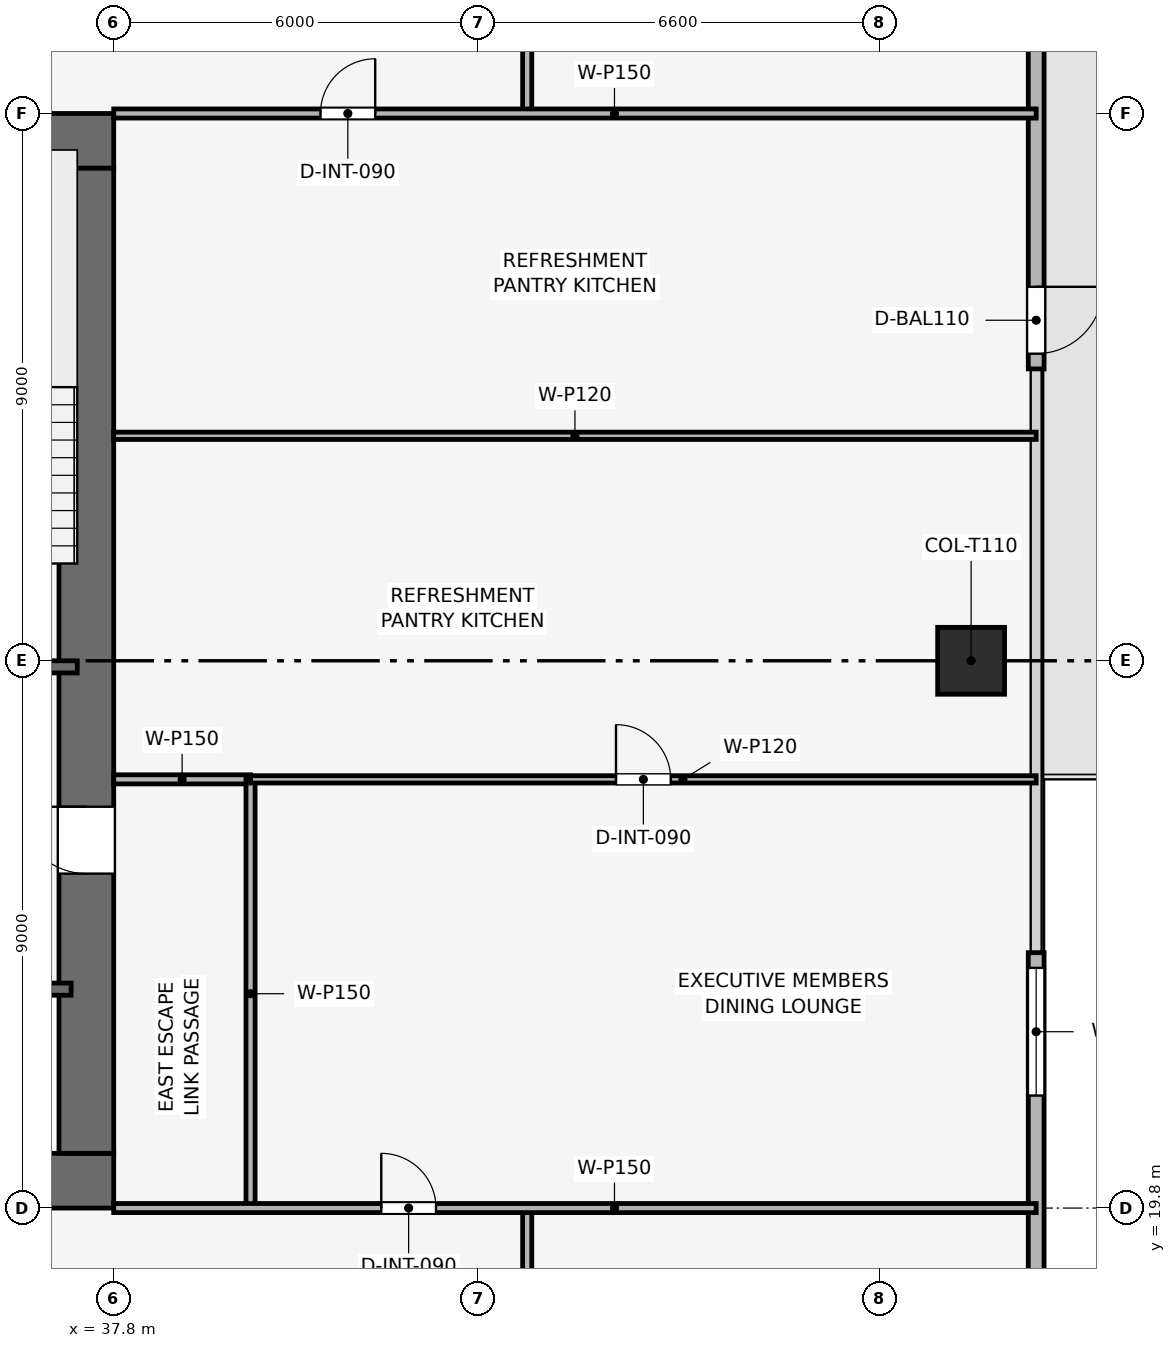
"""IFC4 building model, lengths in metres.
Left out: names, types, materials, properties, quantities, classifications, styles, units other than length and angle.
Written with IfcOpenShell. Run it as: python <this file> out.ifc"""

import sys

from ifc_helpers import new_model, si_unit, direction, frame, frame_2d, origin, origin_2d, place, context, subcontext, project, spatial, rectangle, extrude, element, fill, save


model = new_model("IFC4")
c1 = context("Model", 3, precision=1e-05, world=origin(), true_north=direction((0.0, 1.0)))
c2 = subcontext(c1, "Body", "Model", "MODEL_VIEW")
j1 = project(units=[si_unit("LENGTHUNIT", "METRE"), si_unit("PLANEANGLEUNIT", "RADIAN")], contexts=[c1])
p1 = place(None, origin())
s1 = spatial("IfcSite", under=j1, at=p1, CompositionType="ELEMENT")
p2 = place(p1, origin())
s2 = spatial("IfcBuilding", under=s1, at=p2, CompositionType="ELEMENT")
p3 = place(p2, frame((0.0, 0.0, 187.05)))
s3 = spatial("IfcBuildingStorey", under=s2, at=p3, CompositionType="ELEMENT", Elevation=187.05)
p4 = place(p3, frame((19.8, 20.25, 0.0), z_axis=(0.0, 0.0, 1.0), x_axis=(1.0, 0.0, 0.0)))
e1 = element("IfcWall", 1, at=p4, inside=s3, PredefinedType="SHEAR", context=c2, shape_type="SweptSolid", body=[
    extrude(rectangle(XDim=18.0, YDim=0.9, at=frame_2d((9.0, 0.0))), origin(), (0.0, 0.0, 1.0), 3.75),
])
p5 = place(p4, frame((8.4, 0.0, 0.0)))
e2 = element("IfcOpeningElement", 2, at=p5, cuts=e1, PredefinedType="OPENING", context=c2, shape_type="SweptSolid", body=[
    extrude(rectangle(XDim=1.2, YDim=2.2, at=frame_2d((0.6, 1.1))), frame((0.0, 0.46, 0.0), z_axis=(0.0, -1.0, 0.0), x_axis=(1.0, 0.0, 0.0)), (0.0, 0.0, 1.0), 0.92),
])
p6 = place(p3, frame((19.8, 37.35, 0.0), z_axis=(0.0, 0.0, 1.0), x_axis=(1.0, 0.0, 0.0)))
e3 = element("IfcWall", 3, at=p6, inside=s3, PredefinedType="SHEAR", context=c2, shape_type="SweptSolid", body=[
    extrude(rectangle(XDim=18.0, YDim=0.9, at=frame_2d((9.0, 0.0))), origin(), (0.0, 0.0, 1.0), 3.75),
])
p7 = place(p6, frame((7.05, 0.0, 0.0)))
e4 = element("IfcOpeningElement", 4, at=p7, cuts=e3, PredefinedType="OPENING", context=c2, shape_type="SweptSolid", body=[
    extrude(rectangle(XDim=1.1, YDim=2.15, at=frame_2d((0.55, 1.075))), frame((0.0, 0.46, 0.0), z_axis=(0.0, -1.0, 0.0), x_axis=(1.0, 0.0, 0.0)), (0.0, 0.0, 1.0), 0.92),
])
p8 = place(p3, frame((37.35, 20.7, 0.0), z_axis=(0.0, 0.0, 1.0), x_axis=(0.0, 1.0, 0.0)))
e5 = element("IfcWall", 5, at=p8, inside=s3, PredefinedType="SHEAR", context=c2, shape_type="SweptSolid", body=[
    extrude(rectangle(XDim=16.2, YDim=0.9, at=frame_2d((8.1, 0.0))), origin(), (0.0, 0.0, 1.0), 3.75),
])
p9 = place(p8, frame((4.6, 0.0, 0.0)))
e6 = element("IfcOpeningElement", 6, at=p9, cuts=e5, PredefinedType="OPENING", context=c2, shape_type="SweptSolid", body=[
    extrude(rectangle(XDim=1.1, YDim=2.15, at=frame_2d((0.55, 1.075))), frame((0.0, 0.46, 0.0), z_axis=(0.0, -1.0, 0.0), x_axis=(1.0, 0.0, 0.0)), (0.0, 0.0, 1.0), 0.92),
])
p10 = place(p3, frame((51.9, 28.8, 0.003), z_axis=(0.0, 0.0, 1.0), x_axis=(1.0, 0.0, 0.0)))
e7 = element("IfcColumn", 7, at=p10, inside=s3, PredefinedType="COLUMN", context=c2, shape_type="SweptSolid", body=[
    extrude(rectangle(XDim=1.1, YDim=1.1, at=origin_2d()), origin(), (0.0, 0.0, 1.0), 3.489),
])
p11 = place(p3, frame((52.97, 46.2, 0.0), z_axis=(0.0, 0.0, 1.0), x_axis=(0.0, -1.0, 0.0)))
e8 = element("IfcWall", 8, at=p11, inside=s3, PredefinedType="SOLIDWALL", context=c2, shape_type="SweptSolid", body=[
    extrude(rectangle(XDim=12.6, YDim=0.26, at=frame_2d((6.3, 0.0))), origin(), (0.0, 0.0, 1.0), 3.495),
])
p12 = place(p11, frame((11.25, 0.0, 0.0)))
e9 = element("IfcOpeningElement", 9, at=p12, cuts=e8, PredefinedType="OPENING", context=c2, shape_type="SweptSolid", body=[
    extrude(rectangle(XDim=1.1, YDim=2.2, at=frame_2d((0.55, 1.1))), frame((0.0, 0.14, 0.0), z_axis=(0.0, -1.0, 0.0), x_axis=(1.0, 0.0, 0.0)), (0.0, 0.0, 1.0), 0.28),
])
p13 = place(p3, frame((52.97, 24.0, 0.0), z_axis=(0.0, 0.0, 1.0), x_axis=(0.0, -1.0, 0.0)))
e10 = element("IfcWall", 10, at=p13, inside=s3, PredefinedType="SOLIDWALL", context=c2, shape_type="SweptSolid", body=[
    extrude(rectangle(XDim=12.6, YDim=0.26, at=frame_2d((6.3, 0.0))), origin(), (0.0, 0.0, 1.0), 3.495),
])
p14 = place(p13, frame((0.25, 0.0, 0.9)))
e11 = element("IfcOpeningElement", 11, at=p14, cuts=e10, PredefinedType="OPENING", context=c2, shape_type="SweptSolid", body=[
    extrude(rectangle(XDim=2.1, YDim=2.1, at=frame_2d((1.05, 1.05))), frame((0.0, 0.14, 0.0), z_axis=(0.0, -1.0, 0.0), x_axis=(1.0, 0.0, 0.0)), (0.0, 0.0, 1.0), 0.28),
])
p15 = place(p3, frame((34.05, 28.7, 0.0), z_axis=(0.0, 0.0, 1.0), x_axis=(1.0, 0.0, 0.0)))
e12 = element("IfcWall", 12, at=p15, inside=s3, PredefinedType="SHEAR", context=c2, shape_type="SweptSolid", body=[
    extrude(rectangle(XDim=3.15, YDim=0.2, at=frame_2d((1.575, 0.0))), origin(), (0.0, 0.0, 1.0), 3.495),
])
p16 = place(p15, frame((0.8, 0.0, 0.0)))
e13 = element("IfcOpeningElement", 13, at=p16, cuts=e12, PredefinedType="OPENING", context=c2, shape_type="SweptSolid", body=[
    extrude(rectangle(XDim=1.0, YDim=2.1, at=frame_2d((0.5, 1.05))), frame((0.0, 0.11, 0.0), z_axis=(0.0, -1.0, 0.0), x_axis=(1.0, 0.0, 0.0)), (0.0, 0.0, 1.0), 0.22),
])
p17 = place(p3, frame((34.05, 23.4, 0.0), z_axis=(0.0, 0.0, 1.0), x_axis=(1.0, 0.0, 0.0)))
e14 = element("IfcWall", 14, at=p17, inside=s3, PredefinedType="SHEAR", context=c2, shape_type="SweptSolid", body=[
    extrude(rectangle(XDim=3.05, YDim=0.2, at=frame_2d((1.525, 0.0))), origin(), (0.0, 0.0, 1.0), 3.495),
])
p18 = place(p17, frame((1.2, 0.0, 0.0)))
e15 = element("IfcOpeningElement", 15, at=p18, cuts=e14, PredefinedType="OPENING", context=c2, shape_type="SweptSolid", body=[
    extrude(rectangle(XDim=1.1, YDim=2.15, at=frame_2d((0.55, 1.075))), frame((0.0, 0.11, 0.0), z_axis=(0.0, -1.0, 0.0), x_axis=(1.0, 0.0, 0.0)), (0.0, 0.0, 1.0), 0.22),
])
p19 = place(p3, frame((37.8, 26.85, 0.0), z_axis=(0.0, 0.0, 1.0), x_axis=(1.0, 0.0, 0.0)))
e16 = element("IfcWall", 16, at=p19, inside=s3, PredefinedType="PARTITIONING", context=c2, shape_type="SweptSolid", body=[
    extrude(rectangle(XDim=2.25, YDim=0.15, at=frame_2d((1.125, 0.0))), origin(), (0.0, 0.0, 1.0), 3.495),
])
p20 = place(p3, frame((40.05, 19.8, 0.0), z_axis=(0.0, 0.0, 1.0), x_axis=(0.0, 1.0, 0.0)))
e17 = element("IfcWall", 17, at=p20, inside=s3, PredefinedType="PARTITIONING", context=c2, shape_type="SweptSolid", body=[
    extrude(rectangle(XDim=7.05, YDim=0.15, at=frame_2d((3.525, 0.0))), origin(), (0.0, 0.0, 1.0), 3.03),
])
p21 = place(p3, frame((40.05, 26.85, 0.0), z_axis=(0.0, 0.0, 1.0), x_axis=(1.0, 0.0, 0.0)))
e18 = element("IfcWall", 18, at=p21, inside=s3, PredefinedType="PARTITIONING", context=c2, shape_type="SweptSolid", body=[
    extrude(rectangle(XDim=12.92, YDim=0.12, at=frame_2d((6.46, 0.0))), origin(), (0.0, 0.0, 1.0), 2.98),
])
p22 = place(p21, frame((6.01, 0.0, 0.0)))
e19 = element("IfcOpeningElement", 19, at=p22, cuts=e18, PredefinedType="OPENING", context=c2, shape_type="SweptSolid", body=[
    extrude(rectangle(XDim=0.9, YDim=2.1, at=frame_2d((0.45, 1.05))), frame((0.0, 0.07, 0.0), z_axis=(0.0, -1.0, 0.0), x_axis=(1.0, 0.0, 0.0)), (0.0, 0.0, 1.0), 0.14),
])
p23 = place(p3, frame((37.8, 32.5, 0.0), z_axis=(0.0, 0.0, 1.0), x_axis=(1.0, 0.0, 0.0)))
e20 = element("IfcWall", 20, at=p23, inside=s3, PredefinedType="PARTITIONING", context=c2, shape_type="SweptSolid", body=[
    extrude(rectangle(XDim=15.17, YDim=0.12, at=frame_2d((7.585, 0.0))), origin(), (0.0, 0.0, 1.0), 2.98),
])
p24 = place(p3, frame((44.6, 17.4, 0.0), z_axis=(0.0, 0.0, 1.0), x_axis=(0.0, 1.0, 0.0)))
e21 = element("IfcWall", 21, at=p24, inside=s3, PredefinedType="PARTITIONING", context=c2, shape_type="SweptSolid", body=[
    extrude(rectangle(XDim=2.4, YDim=0.15, at=frame_2d((1.2, 0.0))), origin(), (0.0, 0.0, 1.0), 3.495),
])
p25 = place(p3, frame((44.6, 37.8, 0.0), z_axis=(0.0, 0.0, 1.0), x_axis=(0.0, 1.0, 0.0)))
e22 = element("IfcWall", 22, at=p25, inside=s3, PredefinedType="PARTITIONING", context=c2, shape_type="SweptSolid", body=[
    extrude(rectangle(XDim=2.4, YDim=0.15, at=frame_2d((1.2, 0.0))), origin(), (0.0, 0.0, 1.0), 3.495),
])
p26 = place(p3, frame((37.8, 19.8, 0.0), z_axis=(0.0, 0.0, 1.0), x_axis=(1.0, 0.0, 0.0)))
e23 = element("IfcWall", 23, at=p26, inside=s3, PredefinedType="PARTITIONING", context=c2, shape_type="SweptSolid", body=[
    extrude(rectangle(XDim=15.17, YDim=0.15, at=frame_2d((7.585, 0.0))), origin(), (0.0, 0.0, 1.0), 2.98),
])
p27 = place(p26, frame((4.4, 0.0, 0.0)))
e24 = element("IfcOpeningElement", 24, at=p27, cuts=e23, PredefinedType="OPENING", context=c2, shape_type="SweptSolid", body=[
    extrude(rectangle(XDim=0.9, YDim=2.1, at=frame_2d((0.45, 1.05))), frame((0.0, 0.085, 0.0), z_axis=(0.0, -1.0, 0.0), x_axis=(1.0, 0.0, 0.0)), (0.0, 0.0, 1.0), 0.17),
])
p28 = place(p3, frame((37.8, 37.8, 0.0), z_axis=(0.0, 0.0, 1.0), x_axis=(1.0, 0.0, 0.0)))
e25 = element("IfcWall", 25, at=p28, inside=s3, PredefinedType="PARTITIONING", context=c2, shape_type="SweptSolid", body=[
    extrude(rectangle(XDim=15.17, YDim=0.15, at=frame_2d((7.585, 0.0))), origin(), (0.0, 0.0, 1.0), 2.98),
])
p29 = place(p28, frame((3.4, 0.0, 0.0)))
e26 = element("IfcOpeningElement", 26, at=p29, cuts=e25, PredefinedType="OPENING", context=c2, shape_type="SweptSolid", body=[
    extrude(rectangle(XDim=0.9, YDim=2.1, at=frame_2d((0.45, 1.05))), frame((0.0, 0.085, 0.0), z_axis=(0.0, -1.0, 0.0), x_axis=(1.0, 0.0, 0.0)), (0.0, 0.0, 1.0), 0.17),
])
p30 = place(p12, origin())
e27 = element("IfcDoor", 27, at=p30, inside=s3, OperationType="SINGLE_SWING_LEFT", PredefinedType="DOOR", context=c2, shape_type="SweptSolid", body=[
    extrude(rectangle(XDim=1.1, YDim=2.2, at=frame_2d((0.55, 1.1))), frame((0.0, 0.025, 0.0), z_axis=(0.0, -1.0, 0.0), x_axis=(1.0, 0.0, 0.0)), (0.0, 0.0, 1.0), 0.05),
])
fill(e9, e27)
p31 = place(p14, origin())
e28 = element("IfcWindow", 28, at=p31, inside=s3, PartitioningType="SINGLE_PANEL", PredefinedType="WINDOW", context=c2, shape_type="SweptSolid", body=[
    extrude(rectangle(XDim=2.1, YDim=2.1, at=frame_2d((1.05, 1.05))), frame((0.0, 0.03, 0.0), z_axis=(0.0, -1.0, 0.0), x_axis=(1.0, 0.0, 0.0)), (0.0, 0.0, 1.0), 0.06),
])
fill(e11, e28)
p32 = place(p22, origin())
e29 = element("IfcDoor", 29, at=p32, inside=s3, OperationType="SINGLE_SWING_LEFT", PredefinedType="DOOR", context=c2, shape_type="SweptSolid", body=[
    extrude(rectangle(XDim=0.9, YDim=2.1, at=frame_2d((0.45, 1.05))), frame((0.0, 0.025, 0.0), z_axis=(0.0, -1.0, 0.0), x_axis=(1.0, 0.0, 0.0)), (0.0, 0.0, 1.0), 0.05),
])
fill(e19, e29)
p33 = place(p27, origin())
e30 = element("IfcDoor", 30, at=p33, inside=s3, OperationType="SINGLE_SWING_LEFT", PredefinedType="DOOR", context=c2, shape_type="SweptSolid", body=[
    extrude(rectangle(XDim=0.9, YDim=2.1, at=frame_2d((0.45, 1.05))), frame((0.0, 0.025, 0.0), z_axis=(0.0, -1.0, 0.0), x_axis=(1.0, 0.0, 0.0)), (0.0, 0.0, 1.0), 0.05),
])
fill(e24, e30)
p34 = place(p29, origin())
e31 = element("IfcDoor", 31, at=p34, inside=s3, OperationType="SINGLE_SWING_RIGHT", PredefinedType="DOOR", context=c2, shape_type="SweptSolid", body=[
    extrude(rectangle(XDim=0.9, YDim=2.1, at=frame_2d((0.45, 1.05))), frame((0.0, 0.025, 0.0), z_axis=(0.0, -1.0, 0.0), x_axis=(1.0, 0.0, 0.0)), (0.0, 0.0, 1.0), 0.05),
])
fill(e26, e31)
p35 = place(p9, origin())
e32 = element("IfcDoor", 32, at=p35, inside=s3, OperationType="SINGLE_SWING_RIGHT", PredefinedType="DOOR", context=c2, shape_type="SweptSolid", body=[
    extrude(rectangle(XDim=1.1, YDim=2.15, at=frame_2d((0.55, 1.075))), frame((0.0, 0.025, 0.0), z_axis=(0.0, -1.0, 0.0), x_axis=(1.0, 0.0, 0.0)), (0.0, 0.0, 1.0), 0.05),
])
fill(e6, e32)
save(model, sys.argv[1])
